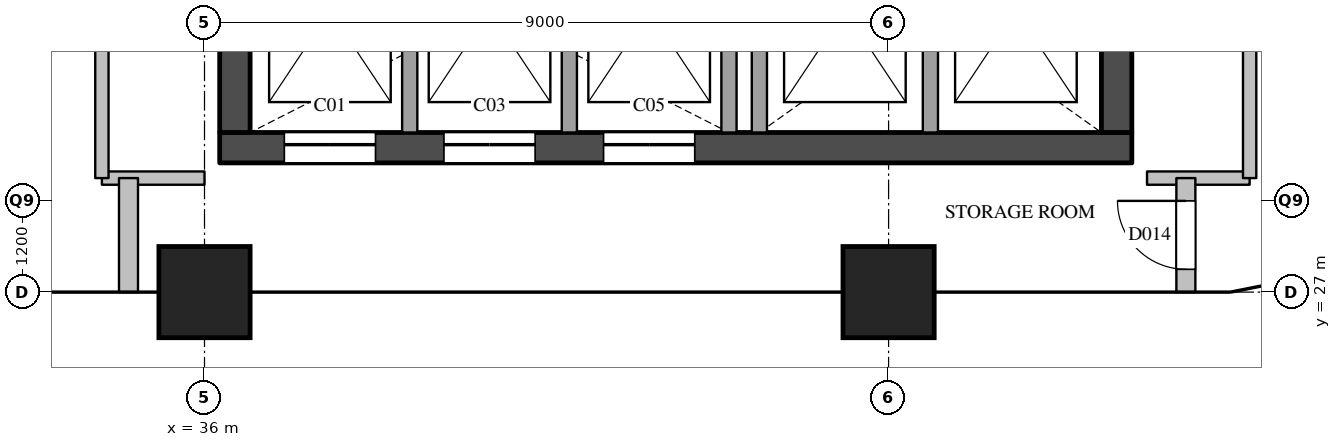
"""IFC4 building model, lengths in metres.
Left out: names, types, materials, properties, quantities, classifications, styles, units other than length and angle.
Written with IfcOpenShell. Run it as: python <this file> out.ifc"""

import sys

from ifc_helpers import new_model, si_unit, direction, frame, frame_2d, origin, origin_2d, place, context, subcontext, project, spatial, rectangle, extrude, element, fill, save


model = new_model("IFC4")
c1 = context("Model", 3, precision=1e-05, world=origin(), true_north=direction((0.0, 1.0)))
c2 = subcontext(c1, "Body", "Model", "MODEL_VIEW")
j1 = project(units=[si_unit("LENGTHUNIT", "METRE"), si_unit("PLANEANGLEUNIT", "RADIAN")], contexts=[c1])
p1 = place(None, origin())
s1 = spatial("IfcSite", under=j1, at=p1, CompositionType="ELEMENT")
p2 = place(p1, origin())
s2 = spatial("IfcBuilding", under=s1, at=p2, CompositionType="ELEMENT")
p3 = place(p2, frame((0.0, 0.0, 257.9)))
s3 = spatial("IfcBuildingStorey", under=s2, at=p3, CompositionType="ELEMENT", Elevation=257.9)
for number, where, z_axis, x_axis in (
    (1, (36.0, 27.0, 0.0), (0.0, 0.0, 1.0), (1.0, 0.0, 0.0)),
    (2, (45.0, 27.0, 0.0), (0.0, 0.0, 1.0), (1.0, 0.0, 0.0)),
):
    element("IfcColumn", number, at=place(p3, frame(where, z_axis=z_axis, x_axis=x_axis)), inside=s3, PredefinedType="COLUMN", context=c2, shape_type="SweptSolid", body=[
        extrude(rectangle(XDim=1.2, YDim=1.2, at=origin_2d()), origin(), (0.0, 0.0, 1.0), 3.9),
    ])
p4 = place(p3, frame((36.2, 28.9, 0.0), z_axis=(0.0, 0.0, 1.0), x_axis=(1.0, 0.0, 0.0)))
e3 = element("IfcWall", 3, at=p4, inside=s3, PredefinedType="SHEAR", context=c2, shape_type="SweptSolid", body=[
    extrude(rectangle(XDim=12.0, YDim=0.4, at=frame_2d((6.0, 0.0))), origin(), (0.0, 0.0, 1.0), 3.6),
])
p5 = place(p4, frame((0.85, 0.0, 0.0)))
e4 = element("IfcOpeningElement", 4, at=p5, cuts=e3, PredefinedType="OPENING", context=c2, shape_type="SweptSolid", body=[
    extrude(rectangle(XDim=1.2, YDim=2.1, at=frame_2d((0.6, 1.05))), frame((0.0, 0.21, 0.0), z_axis=(0.0, -1.0, 0.0), x_axis=(1.0, 0.0, 0.0)), (0.0, 0.0, 1.0), 0.42),
])
p6 = place(p4, frame((2.95, 0.0, 0.0)))
e5 = element("IfcOpeningElement", 5, at=p6, cuts=e3, PredefinedType="OPENING", context=c2, shape_type="SweptSolid", body=[
    extrude(rectangle(XDim=1.2, YDim=2.1, at=frame_2d((0.6, 1.05))), frame((0.0, 0.21, 0.0), z_axis=(0.0, -1.0, 0.0), x_axis=(1.0, 0.0, 0.0)), (0.0, 0.0, 1.0), 0.42),
])
p7 = place(p4, frame((5.05, 0.0, 0.0)))
e6 = element("IfcOpeningElement", 6, at=p7, cuts=e3, PredefinedType="OPENING", context=c2, shape_type="SweptSolid", body=[
    extrude(rectangle(XDim=1.2, YDim=2.1, at=frame_2d((0.6, 1.05))), frame((0.0, 0.21, 0.0), z_axis=(0.0, -1.0, 0.0), x_axis=(1.0, 0.0, 0.0)), (0.0, 0.0, 1.0), 0.42),
])
p8 = place(p3, frame((36.4, 29.1, 0.0), z_axis=(0.0, 0.0, 1.0), x_axis=(0.0, 1.0, 0.0)))
e7 = element("IfcWall", 7, at=p8, inside=s3, PredefinedType="SHEAR", context=c2, shape_type="SweptSolid", body=[
    extrude(rectangle(XDim=20.3, YDim=0.4, at=frame_2d((10.15, 0.0))), origin(), (0.0, 0.0, 1.0), 3.6),
])
p9 = place(p8, frame((3.6, 0.0, 0.0)))
e8 = element("IfcOpeningElement", 8, at=p9, cuts=e7, PredefinedType="OPENING", context=c2, shape_type="SweptSolid", body=[
    extrude(rectangle(XDim=1.8, YDim=2.1, at=frame_2d((0.9, 1.05))), frame((0.0, 0.21, 0.0), z_axis=(0.0, -1.0, 0.0), x_axis=(1.0, 0.0, 0.0)), (0.0, 0.0, 1.0), 0.42),
])
p10 = place(p8, frame((16.4, 0.0, 0.0)))
e9 = element("IfcOpeningElement", 9, at=p10, cuts=e7, PredefinedType="OPENING", context=c2, shape_type="SweptSolid", body=[
    extrude(rectangle(XDim=1.0, YDim=2.1, at=frame_2d((0.5, 1.05))), frame((0.0, 0.21, 0.0), z_axis=(0.0, -1.0, 0.0), x_axis=(1.0, 0.0, 0.0)), (0.0, 0.0, 1.0), 0.42),
])
p11 = place(p3, frame((48.0, 29.1, 0.0), z_axis=(0.0, 0.0, 1.0), x_axis=(0.0, 1.0, 0.0)))
e10 = element("IfcWall", 10, at=p11, inside=s3, PredefinedType="SHEAR", context=c2, shape_type="SweptSolid", body=[
    extrude(rectangle(XDim=20.3, YDim=0.4, at=frame_2d((10.15, 0.0))), origin(), (0.0, 0.0, 1.0), 3.6),
])
p12 = place(p11, frame((12.5, 0.0, 0.0)))
e11 = element("IfcOpeningElement", 11, at=p12, cuts=e10, PredefinedType="OPENING", context=c2, shape_type="SweptSolid", body=[
    extrude(rectangle(XDim=0.7, YDim=2.1, at=frame_2d((0.35, 1.05))), frame((0.0, 0.21, 0.0), z_axis=(0.0, -1.0, 0.0), x_axis=(1.0, 0.0, 0.0)), (0.0, 0.0, 1.0), 0.42),
])
p13 = place(p11, frame((3.9, 0.0, 0.0)))
e12 = element("IfcOpeningElement", 12, at=p13, cuts=e10, PredefinedType="OPENING", context=c2, shape_type="SweptSolid", body=[
    extrude(rectangle(XDim=1.8, YDim=2.1, at=frame_2d((0.9, 1.05))), frame((0.0, 0.21, 0.0), z_axis=(0.0, -1.0, 0.0), x_axis=(1.0, 0.0, 0.0)), (0.0, 0.0, 1.0), 0.42),
])
for number, where, z_axis, x_axis in (
    (13, (38.7, 29.1, 0.0), (0.0, 0.0, 1.0), (0.0, 1.0, 0.0)),
    (14, (40.8, 29.1, 0.0), (0.0, 0.0, 1.0), (0.0, 1.0, 0.0)),
    (15, (42.9, 29.1, 0.0), (0.0, 0.0, 1.0), (0.0, 1.0, 0.0)),
):
    element("IfcWall", number, at=place(p3, frame(where, z_axis=z_axis, x_axis=x_axis)), inside=s3, PredefinedType="SOLIDWALL", context=c2, shape_type="SweptSolid", body=[
        extrude(rectangle(XDim=3.2, YDim=0.2, at=frame_2d((1.6, 0.0))), origin(), (0.0, 0.0, 1.0), 3.6),
    ])
p14 = place(p3, frame((43.3, 29.1, 0.0), z_axis=(0.0, 0.0, 1.0), x_axis=(0.0, 1.0, 0.0)))
e16 = element("IfcWall", 16, at=p14, inside=s3, PredefinedType="SOLIDWALL", context=c2, shape_type="SweptSolid", body=[
    extrude(rectangle(XDim=9.9, YDim=0.2, at=frame_2d((4.95, 0.0))), origin(), (0.0, 0.0, 1.0), 3.6),
])
p15 = place(p3, frame((45.55, 29.1, 0.0), z_axis=(0.0, 0.0, 1.0), x_axis=(0.0, 1.0, 0.0)))
e17 = element("IfcWall", 17, at=p15, inside=s3, PredefinedType="SOLIDWALL", context=c2, shape_type="SweptSolid", body=[
    extrude(rectangle(XDim=3.2, YDim=0.2, at=frame_2d((1.6, 0.0))), origin(), (0.0, 0.0, 1.0), 3.6),
])
for number, where, z_axis, x_axis in (
    (18, (34.65, 28.5, 0.0), (0.0, 0.0, 1.0), (1.0, 0.0, 0.0)),
    (19, (48.4, 28.5, 0.0), (0.0, 0.0, 1.0), (1.0, 0.0, 0.0)),
):
    element("IfcWall", number, at=place(p3, frame(where, z_axis=z_axis, x_axis=x_axis)), inside=s3, PredefinedType="PARTITIONING", context=c2, shape_type="SweptSolid", body=[
        extrude(rectangle(XDim=1.35, YDim=0.175, at=frame_2d((0.675, 0.0))), origin(), (0.0, 0.0, 1.0), 3.6),
    ])
p16 = place(p3, frame((34.65, 28.5, 0.0), z_axis=(0.0, 0.0, 1.0), x_axis=(0.0, 1.0, 0.0)))
e20 = element("IfcWall", 20, at=p16, inside=s3, PredefinedType="PARTITIONING", context=c2, shape_type="SweptSolid", body=[
    extrude(rectangle(XDim=22.85, YDim=0.175, at=frame_2d((11.425, 0.0))), origin(), (0.0, 0.0, 1.0), 3.6),
])
p17 = place(p16, frame((5.3, 0.0, 0.0)))
e21 = element("IfcOpeningElement", 21, at=p17, cuts=e20, PredefinedType="OPENING", context=c2, shape_type="SweptSolid", body=[
    extrude(rectangle(XDim=0.9, YDim=2.1, at=frame_2d((0.45, 1.05))), frame((0.0, 0.097, 0.0), z_axis=(0.0, -1.0, 0.0), x_axis=(1.0, 0.0, 0.0)), (0.0, 0.0, 1.0), 0.195),
])
p18 = place(p16, frame((13.5, 0.0, 0.0)))
e22 = element("IfcOpeningElement", 22, at=p18, cuts=e20, PredefinedType="OPENING", context=c2, shape_type="SweptSolid", body=[
    extrude(rectangle(XDim=1.0, YDim=2.1, at=frame_2d((0.5, 1.05))), frame((0.0, 0.097, 0.0), z_axis=(0.0, -1.0, 0.0), x_axis=(1.0, 0.0, 0.0)), (0.0, 0.0, 1.0), 0.195),
])
p19 = place(p16, frame((16.9, 0.0, 0.0)))
e23 = element("IfcOpeningElement", 23, at=p19, cuts=e20, PredefinedType="OPENING", context=c2, shape_type="SweptSolid", body=[
    extrude(rectangle(XDim=1.0, YDim=2.1, at=frame_2d((0.5, 1.05))), frame((0.0, 0.097, 0.0), z_axis=(0.0, -1.0, 0.0), x_axis=(1.0, 0.0, 0.0)), (0.0, 0.0, 1.0), 0.195),
])
p20 = place(p3, frame((49.75, 28.5, 0.0), z_axis=(0.0, 0.0, 1.0), x_axis=(0.0, 1.0, 0.0)))
e24 = element("IfcWall", 24, at=p20, inside=s3, PredefinedType="PARTITIONING", context=c2, shape_type="SweptSolid", body=[
    extrude(rectangle(XDim=22.85, YDim=0.175, at=frame_2d((11.425, 0.0))), origin(), (0.0, 0.0, 1.0), 3.6),
])
p21 = place(p20, frame((5.3, 0.0, 0.0)))
e25 = element("IfcOpeningElement", 25, at=p21, cuts=e24, PredefinedType="OPENING", context=c2, shape_type="SweptSolid", body=[
    extrude(rectangle(XDim=0.9, YDim=2.1, at=frame_2d((0.45, 1.05))), frame((0.0, 0.097, 0.0), z_axis=(0.0, -1.0, 0.0), x_axis=(1.0, 0.0, 0.0)), (0.0, 0.0, 1.0), 0.195),
])
p22 = place(p20, frame((16.725, 0.0, 0.0)))
e26 = element("IfcOpeningElement", 26, at=p22, cuts=e24, PredefinedType="OPENING", context=c2, shape_type="SweptSolid", body=[
    extrude(rectangle(XDim=0.9, YDim=2.1, at=frame_2d((0.45, 1.05))), frame((0.0, 0.097, 0.0), z_axis=(0.0, -1.0, 0.0), x_axis=(1.0, 0.0, 0.0)), (0.0, 0.0, 1.0), 0.195),
])
p23 = place(p3, frame((35.0, 27.0, 0.0), z_axis=(0.0, 0.0, 1.0), x_axis=(0.0, 1.0, 0.0)))
e27 = element("IfcWall", 27, at=p23, inside=s3, PredefinedType="PARTITIONING", context=c2, shape_type="SweptSolid", body=[
    extrude(rectangle(XDim=1.5, YDim=0.25, at=frame_2d((0.75, 0.0))), origin(), (0.0, 0.0, 1.0), 2.6),
])
p24 = place(p3, frame((48.911, 27.0, 0.0), z_axis=(0.0, 0.0, 1.0), x_axis=(0.0, 1.0, 0.0)))
e28 = element("IfcWall", 28, at=p24, inside=s3, PredefinedType="PARTITIONING", context=c2, shape_type="SweptSolid", body=[
    extrude(rectangle(XDim=1.5, YDim=0.25, at=frame_2d((0.75, 0.0))), origin(), (0.0, 0.0, 1.0), 2.6),
])
p25 = place(p24, frame((0.3, 0.0, 0.0)))
e29 = element("IfcOpeningElement", 29, at=p25, cuts=e28, PredefinedType="OPENING", context=c2, shape_type="SweptSolid", body=[
    extrude(rectangle(XDim=0.9, YDim=2.1, at=frame_2d((0.45, 1.05))), frame((0.0, 0.135, 0.0), z_axis=(0.0, -1.0, 0.0), x_axis=(1.0, 0.0, 0.0)), (0.0, 0.0, 1.0), 0.27),
])
p26 = place(p5, origin())
e30 = element("IfcDoor", 30, at=p26, inside=s3, OperationType="SLIDING_TO_LEFT", PredefinedType="DOOR", context=c2, shape_type="SweptSolid", body=[
    extrude(rectangle(XDim=1.2, YDim=2.1, at=frame_2d((0.6, 1.05))), frame((0.0, 0.025, 0.0), z_axis=(0.0, -1.0, 0.0), x_axis=(1.0, 0.0, 0.0)), (0.0, 0.0, 1.0), 0.05),
])
fill(e4, e30)
p27 = place(p6, origin())
e31 = element("IfcDoor", 31, at=p27, inside=s3, OperationType="SLIDING_TO_LEFT", PredefinedType="DOOR", context=c2, shape_type="SweptSolid", body=[
    extrude(rectangle(XDim=1.2, YDim=2.1, at=frame_2d((0.6, 1.05))), frame((0.0, 0.025, 0.0), z_axis=(0.0, -1.0, 0.0), x_axis=(1.0, 0.0, 0.0)), (0.0, 0.0, 1.0), 0.05),
])
fill(e5, e31)
p28 = place(p7, origin())
e32 = element("IfcDoor", 32, at=p28, inside=s3, OperationType="SLIDING_TO_LEFT", PredefinedType="DOOR", context=c2, shape_type="SweptSolid", body=[
    extrude(rectangle(XDim=1.2, YDim=2.1, at=frame_2d((0.6, 1.05))), frame((0.0, 0.025, 0.0), z_axis=(0.0, -1.0, 0.0), x_axis=(1.0, 0.0, 0.0)), (0.0, 0.0, 1.0), 0.05),
])
fill(e6, e32)
p29 = place(p25, origin())
e33 = element("IfcDoor", 33, at=p29, inside=s3, OperationType="SINGLE_SWING_RIGHT", PredefinedType="DOOR", context=c2, shape_type="SweptSolid", body=[
    extrude(rectangle(XDim=0.9, YDim=2.1, at=frame_2d((0.45, 1.05))), frame((0.0, 0.025, 0.0), z_axis=(0.0, -1.0, 0.0), x_axis=(1.0, 0.0, 0.0)), (0.0, 0.0, 1.0), 0.05),
])
fill(e29, e33)
save(model, sys.argv[1])
